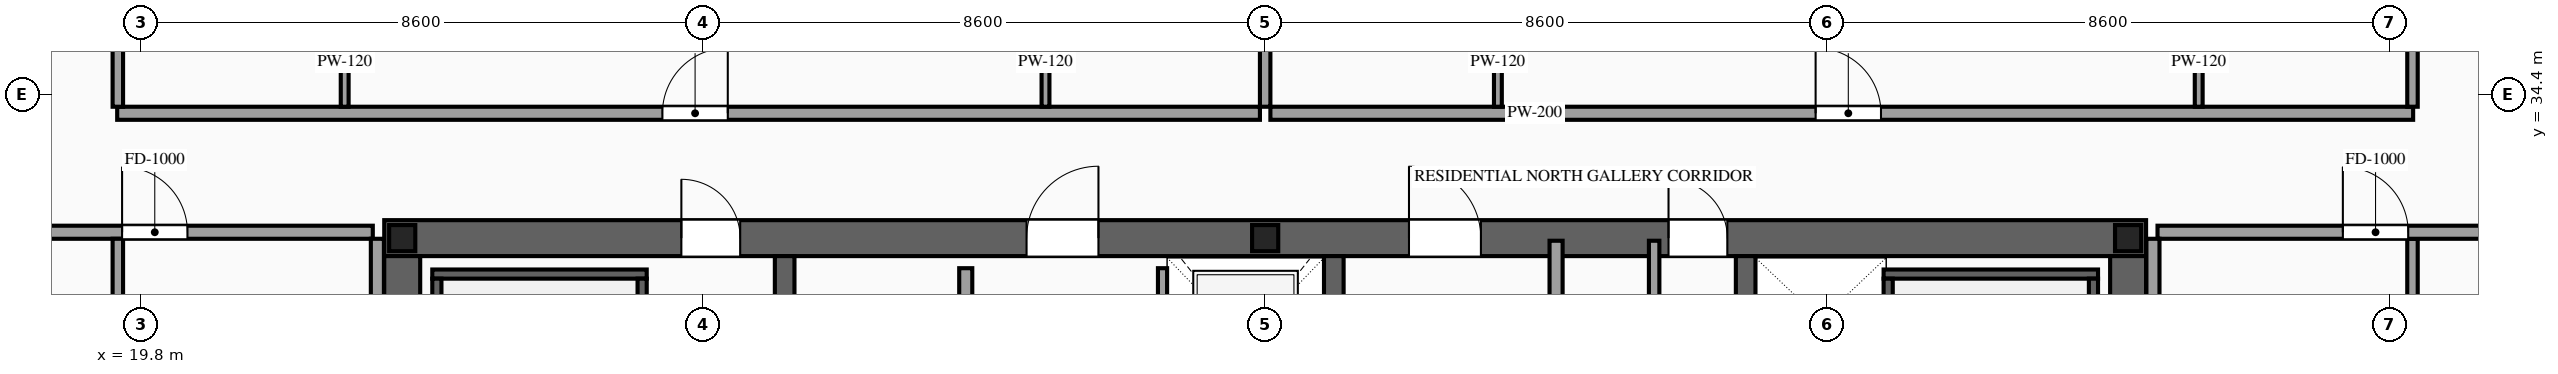
"""IFC4 building model, lengths in metres.
Left out: names, types, materials, properties, quantities, classifications, styles, units other than length and angle.
Written with IfcOpenShell. Run it as: python <this file> out.ifc"""

import sys

from ifc_helpers import new_model, si_unit, direction, frame, frame_2d, origin, origin_2d, place, context, subcontext, project, spatial, rectangle, i_section, extrude, source, transform, mapped, element, fill, save


model = new_model("IFC4")
c1 = context("Model", 3, precision=1e-05, world=origin(), true_north=direction((0.0, 1.0)))
c2 = subcontext(c1, "Body", "Model", "MODEL_VIEW")
j1 = project(units=[si_unit("LENGTHUNIT", "METRE"), si_unit("PLANEANGLEUNIT", "RADIAN")], contexts=[c1])
p1 = place(None, origin())
s1 = spatial("IfcSite", under=j1, at=p1, CompositionType="ELEMENT")
p2 = place(p1, origin())
s2 = spatial("IfcBuilding", under=s1, at=p2, CompositionType="ELEMENT")
p3 = place(p2, frame((0.0, 0.0, 231.1)))
s3 = spatial("IfcBuildingStorey", under=s2, at=p3, CompositionType="ELEMENT", Elevation=231.1)
p4 = place(p3, frame((23.525, 32.2, 0.0), z_axis=(0.0, 0.0, 1.0), x_axis=(1.0, 0.0, 0.0)))
e1 = element("IfcWall", 1, at=p4, inside=s3, PredefinedType="SHEAR", context=c2, shape_type="SweptSolid", body=[
    extrude(rectangle(XDim=26.95, YDim=0.55, at=frame_2d((13.475, 0.0))), origin(), (0.0, 0.0, 1.0), 3.5),
])
p5 = place(p4, frame((4.545, 0.0, 0.0)))
e2 = element("IfcOpeningElement", 2, at=p5, cuts=e1, PredefinedType="OPENING", context=c2, shape_type="SweptSolid", body=[
    extrude(rectangle(XDim=0.9, YDim=2.15, at=frame_2d((0.45, 1.075))), frame((0.0, 0.29, 0.0), z_axis=(0.0, -1.0, 0.0), x_axis=(1.0, 0.0, 0.0)), (0.0, 0.0, 1.0), 0.58),
])
p6 = place(p4, frame((9.825, 0.0, 0.0)))
e3 = element("IfcOpeningElement", 3, at=p6, cuts=e1, PredefinedType="OPENING", context=c2, shape_type="SweptSolid", body=[
    extrude(rectangle(XDim=1.1, YDim=2.2, at=frame_2d((0.55, 1.1))), frame((0.0, 0.29, 0.0), z_axis=(0.0, -1.0, 0.0), x_axis=(1.0, 0.0, 0.0)), (0.0, 0.0, 1.0), 0.58),
])
p7 = place(p4, frame((15.675, 0.0, 0.0)))
e4 = element("IfcOpeningElement", 4, at=p7, cuts=e1, PredefinedType="OPENING", context=c2, shape_type="SweptSolid", body=[
    extrude(rectangle(XDim=1.1, YDim=2.2, at=frame_2d((0.55, 1.1))), frame((0.0, 0.29, 0.0), z_axis=(0.0, -1.0, 0.0), x_axis=(1.0, 0.0, 0.0)), (0.0, 0.0, 1.0), 0.58),
])
p8 = place(p4, frame((19.645, 0.0, 0.0)))
e5 = element("IfcOpeningElement", 5, at=p8, cuts=e1, PredefinedType="OPENING", context=c2, shape_type="SweptSolid", body=[
    extrude(rectangle(XDim=0.9, YDim=2.15, at=frame_2d((0.45, 1.075))), frame((0.0, 0.29, 0.0), z_axis=(0.0, -1.0, 0.0), x_axis=(1.0, 0.0, 0.0)), (0.0, 0.0, 1.0), 0.58),
])
m1 = source(origin(), c2, "Body", "SweptSolid", [
    extrude(rectangle(XDim=12.25, YDim=0.55, at=frame_2d((6.125, 0.0))), origin(), (0.0, 0.0, 1.0), 3.5),
])
for number, where, z_axis, x_axis in (
    (6, (23.8, 19.675, 0.0), (0.0, 0.0, 1.0), (0.0, 1.0, 0.0)),
    (7, (50.2, 19.675, 0.0), (0.0, 0.0, 1.0), (0.0, 1.0, 0.0)),
):
    element("IfcWall", number, at=place(p3, frame(where, z_axis=z_axis, x_axis=x_axis)), inside=s3, PredefinedType="SHEAR", context=c2, shape_type="MappedRepresentation", body=[
        mapped(m1, transform((0.0, 0.0, 0.0), scale=1.0)),
    ])
m2 = source(origin(), c2, "Body", "SweptSolid", [
    extrude(rectangle(XDim=12.25, YDim=0.3, at=frame_2d((6.125, 0.0))), origin(), (0.0, 0.0, 1.0), 3.5),
])
for number, where, z_axis, x_axis in (
    (8, (29.65, 19.675, 0.0), (0.0, 0.0, 1.0), (0.0, 1.0, 0.0)),
    (9, (38.05, 19.675, 0.0), (0.0, 0.0, 1.0), (0.0, 1.0, 0.0)),
    (10, (44.35, 19.675, 0.0), (0.0, 0.0, 1.0), (0.0, 1.0, 0.0)),
):
    element("IfcWall", number, at=place(p3, frame(where, z_axis=z_axis, x_axis=x_axis)), inside=s3, PredefinedType="SOLIDWALL", context=c2, shape_type="MappedRepresentation", body=[
        mapped(m2, transform((0.0, 0.0, 0.0), scale=1.0)),
    ])
m3 = source(origin(), c2, "Body", "SweptSolid", [
    extrude(i_section(OverallWidth=0.4, OverallDepth=0.4, WebThickness=0.013, FlangeThickness=0.021, at=origin_2d()), origin(), (0.0, 0.0, 1.0), 3.5),
])
for number, where, z_axis, x_axis in (
    (11, (23.8, 32.2, 0.0), (0.0, 0.0, 1.0), (1.0, 0.0, 0.0)),
    (12, (37.0, 32.2, 0.0), (0.0, 0.0, 1.0), (1.0, 0.0, 0.0)),
    (13, (50.2, 32.2, 0.0), (0.0, 0.0, 1.0), (1.0, 0.0, 0.0)),
):
    element("IfcColumn", number, at=place(p3, frame(where, z_axis=z_axis, x_axis=x_axis)), inside=s3, PredefinedType="COLUMN", context=c2, shape_type="MappedRepresentation", body=[
        mapped(m3, transform((0.0, 0.0, 0.0), scale=1.0)),
    ])
p9 = place(p3, frame((35.43, 29.4, 0.0), z_axis=(0.0, 0.0, 1.0), x_axis=(0.0, 1.0, 0.0)))
e14 = element("IfcWall", 14, at=p9, inside=s3, PredefinedType="SOLIDWALL", context=c2, shape_type="SweptSolid", body=[
    extrude(rectangle(XDim=2.34, YDim=0.14, at=frame_2d((1.17, 0.0))), origin(), (0.0, 0.0, 1.0), 3.28),
])
p10 = place(p9, frame((0.62, 0.0, 0.0)))
e15 = element("IfcOpeningElement", 15, at=p10, cuts=e14, PredefinedType="OPENING", context=c2, shape_type="SweptSolid", body=[
    extrude(rectangle(XDim=1.1, YDim=2.2, at=frame_2d((0.55, 1.1))), frame((0.0, 0.085, 0.0), z_axis=(0.0, -1.0, 0.0), x_axis=(1.0, 0.0, 0.0)), (0.0, 0.0, 1.0), 0.17),
])
m4 = source(origin(), c2, "Body", "SweptSolid", [
    extrude(rectangle(XDim=3.28, YDim=0.14, at=frame_2d((1.64, 0.0))), origin(), (0.0, 0.0, 1.0), 3.28),
])
p11 = place(p3, frame((24.26, 31.65, 0.0), z_axis=(0.0, 0.0, 1.0), x_axis=(1.0, 0.0, 0.0)))
e16 = element("IfcWall", 16, at=p11, inside=s3, PredefinedType="SOLIDWALL", context=c2, shape_type="MappedRepresentation", body=[
    mapped(m4, transform((0.0, 0.0, 0.0), scale=1.0)),
])
m5 = source(origin(), c2, "Body", "SweptSolid", [
    extrude(rectangle(XDim=8.94, YDim=0.14, at=frame_2d((4.47, 0.0))), origin(), (0.0, 0.0, 1.0), 3.28),
])
for number, where, z_axis, x_axis in (
    (17, (24.33, 22.64, 0.0), (0.0, 0.0, 1.0), (0.0, 1.0, 0.0)),
    (18, (27.47, 22.64, 0.0), (0.0, 0.0, 1.0), (0.0, 1.0, 0.0)),
):
    element("IfcWall", number, at=place(p3, frame(where, z_axis=z_axis, x_axis=x_axis)), inside=s3, PredefinedType="SOLIDWALL", context=c2, shape_type="MappedRepresentation", body=[
        mapped(m5, transform((0.0, 0.0, 0.0), scale=1.0)),
    ])
p12 = place(p3, frame((46.46, 31.65, 0.0), z_axis=(0.0, 0.0, 1.0), x_axis=(1.0, 0.0, 0.0)))
e19 = element("IfcWall", 19, at=p12, inside=s3, PredefinedType="SOLIDWALL", context=c2, shape_type="MappedRepresentation", body=[
    mapped(m4, transform((0.0, 0.0, 0.0), scale=1.0)),
])
for number, where, z_axis, x_axis in (
    (20, (46.53, 22.64, 0.0), (0.0, 0.0, 1.0), (0.0, 1.0, 0.0)),
    (21, (49.67, 22.64, 0.0), (0.0, 0.0, 1.0), (0.0, 1.0, 0.0)),
):
    element("IfcWall", number, at=place(p3, frame(where, z_axis=z_axis, x_axis=x_axis)), inside=s3, PredefinedType="SOLIDWALL", context=c2, shape_type="MappedRepresentation", body=[
        mapped(m5, transform((0.0, 0.0, 0.0), scale=1.0)),
    ])
p13 = place(p3, frame((32.42, 25.92, 0.0), z_axis=(0.0, 0.0, 1.0), x_axis=(0.0, 1.0, 0.0)))
e22 = element("IfcWall", 22, at=p13, inside=s3, PredefinedType="PARTITIONING", context=c2, shape_type="SweptSolid", body=[
    extrude(rectangle(XDim=5.82, YDim=0.2, at=frame_2d((2.91, 0.0))), origin(), (0.0, 0.0, 1.0), 3.28),
])
p14 = place(p13, frame((2.46, 0.0, 0.0)))
e23 = element("IfcOpeningElement", 23, at=p14, cuts=e22, PredefinedType="OPENING", context=c2, shape_type="SweptSolid", body=[
    extrude(rectangle(XDim=0.9, YDim=2.15, at=frame_2d((0.45, 1.075))), frame((0.0, 0.115, 0.0), z_axis=(0.0, -1.0, 0.0), x_axis=(1.0, 0.0, 0.0)), (0.0, 0.0, 1.0), 0.23),
])
m6 = source(origin(), c2, "Body", "SweptSolid", [
    extrude(rectangle(XDim=12.72, YDim=0.2, at=frame_2d((6.36, 0.0))), origin(), (0.0, 0.0, 1.0), 3.28),
])
p15 = place(p3, frame((41.45, 19.44, 0.0), z_axis=(0.0, 0.0, 1.0), x_axis=(0.0, 1.0, 0.0)))
e24 = element("IfcWall", 24, at=p15, inside=s3, PredefinedType="PARTITIONING", context=c2, shape_type="MappedRepresentation", body=[
    mapped(m6, transform((0.0, 0.0, 0.0), scale=1.0)),
])
m7 = source(origin(), c2, "Body", "SweptSolid", [
    extrude(rectangle(XDim=10.72, YDim=0.16, at=frame_2d((5.36, 0.0))), origin(), (0.0, 0.0, 1.0), 3.28),
])
p16 = place(p3, frame((42.95, 21.44, 0.0), z_axis=(0.0, 0.0, 1.0), x_axis=(0.0, 1.0, 0.0)))
e25 = element("IfcWall", 25, at=p16, inside=s3, PredefinedType="PARTITIONING", context=c2, shape_type="MappedRepresentation", body=[
    mapped(m7, transform((0.0, 0.0, 0.0), scale=1.0)),
])
p17 = place(p3, frame((19.44, 34.11, 0.0), z_axis=(0.0, 0.0, 1.0), x_axis=(1.0, 0.0, 0.0)))
e26 = element("IfcWall", 26, at=p17, inside=s3, PredefinedType="PARTITIONING", context=c2, shape_type="SweptSolid", body=[
    extrude(rectangle(XDim=17.48, YDim=0.2, at=frame_2d((8.74, 0.0))), origin(), (0.0, 0.0, 1.0), 3.28),
])
p18 = place(p17, frame((8.34, 0.0, 0.0)))
e27 = element("IfcOpeningElement", 27, at=p18, cuts=e26, PredefinedType="OPENING", context=c2, shape_type="SweptSolid", body=[
    extrude(rectangle(XDim=1.0, YDim=2.2, at=frame_2d((0.5, 1.1))), frame((0.0, 0.115, 0.0), z_axis=(0.0, -1.0, 0.0), x_axis=(1.0, 0.0, 0.0)), (0.0, 0.0, 1.0), 0.23),
])
m8 = source(origin(), c2, "Body", "SweptSolid", [
    extrude(rectangle(XDim=12.04, YDim=0.16, at=frame_2d((6.02, 0.0))), origin(), (0.0, 0.0, 1.0), 2.787),
])
p19 = place(p3, frame((37.0, 34.21, 0.0), z_axis=(0.0, 0.0, 1.0), x_axis=(0.0, 1.0, 0.0)))
e28 = element("IfcWall", 28, at=p19, inside=s3, PredefinedType="PARTITIONING", context=c2, shape_type="MappedRepresentation", body=[
    mapped(m8, transform((0.0, 0.0, 0.0), scale=1.0)),
])
p20 = place(p3, frame((22.92, 34.21, 0.0), z_axis=(0.0, 0.0, 1.0), x_axis=(0.0, 1.0, 0.0)))
e29 = element("IfcWall", 29, at=p20, inside=s3, PredefinedType="PARTITIONING", context=c2, shape_type="SweptSolid", body=[
    extrude(rectangle(XDim=4.11, YDim=0.12, at=frame_2d((2.055, 0.0))), origin(), (0.0, 0.0, 1.0), 3.28),
])
p21 = place(p20, frame((1.63, 0.0, 0.0)))
e30 = element("IfcOpeningElement", 30, at=p21, cuts=e29, PredefinedType="OPENING", context=c2, shape_type="SweptSolid", body=[
    extrude(rectangle(XDim=0.85, YDim=2.1, at=frame_2d((0.425, 1.05))), frame((0.0, 0.075, 0.0), z_axis=(0.0, -1.0, 0.0), x_axis=(1.0, 0.0, 0.0)), (0.0, 0.0, 1.0), 0.15),
])
p22 = place(p3, frame((33.64, 34.21, 0.0), z_axis=(0.0, 0.0, 1.0), x_axis=(0.0, 1.0, 0.0)))
e31 = element("IfcWall", 31, at=p22, inside=s3, PredefinedType="PARTITIONING", context=c2, shape_type="SweptSolid", body=[
    extrude(rectangle(XDim=4.11, YDim=0.12, at=frame_2d((2.055, 0.0))), origin(), (0.0, 0.0, 1.0), 3.28),
])
p23 = place(p22, frame((1.63, 0.0, 0.0)))
e32 = element("IfcOpeningElement", 32, at=p23, cuts=e31, PredefinedType="OPENING", context=c2, shape_type="SweptSolid", body=[
    extrude(rectangle(XDim=0.85, YDim=2.1, at=frame_2d((0.425, 1.05))), frame((0.0, 0.075, 0.0), z_axis=(0.0, -1.0, 0.0), x_axis=(1.0, 0.0, 0.0)), (0.0, 0.0, 1.0), 0.15),
])
p24 = place(p3, frame((37.08, 34.11, 0.0), z_axis=(0.0, 0.0, 1.0), x_axis=(1.0, 0.0, 0.0)))
e33 = element("IfcWall", 33, at=p24, inside=s3, PredefinedType="PARTITIONING", context=c2, shape_type="SweptSolid", body=[
    extrude(rectangle(XDim=17.48, YDim=0.2, at=frame_2d((8.74, 0.0))), origin(), (0.0, 0.0, 1.0), 3.28),
])
p25 = place(p24, frame((8.34, 0.0, 0.0)))
e34 = element("IfcOpeningElement", 34, at=p25, cuts=e33, PredefinedType="OPENING", context=c2, shape_type="SweptSolid", body=[
    extrude(rectangle(XDim=1.0, YDim=2.2, at=frame_2d((0.5, 1.1))), frame((0.0, 0.115, 0.0), z_axis=(0.0, -1.0, 0.0), x_axis=(1.0, 0.0, 0.0)), (0.0, 0.0, 1.0), 0.23),
])
m9 = source(origin(), c2, "Body", "SweptSolid", [
    extrude(rectangle(XDim=11.89, YDim=0.16, at=frame_2d((5.945, 0.0))), origin(), (0.0, 0.0, 1.0), 3.28),
])
for number, where, z_axis, x_axis in (
    (35, (19.45, 34.21, 0.0), (0.0, 0.0, 1.0), (0.0, 1.0, 0.0)),
    (36, (54.55, 34.21, 0.0), (0.0, 0.0, 1.0), (0.0, 1.0, 0.0)),
):
    element("IfcWall", number, at=place(p3, frame(where, z_axis=z_axis, x_axis=x_axis)), inside=s3, PredefinedType="PARTITIONING", context=c2, shape_type="MappedRepresentation", body=[
        mapped(m9, transform((0.0, 0.0, 0.0), scale=1.0)),
    ])
p26 = place(p3, frame((40.56, 34.21, 0.0), z_axis=(0.0, 0.0, 1.0), x_axis=(0.0, 1.0, 0.0)))
e37 = element("IfcWall", 37, at=p26, inside=s3, PredefinedType="PARTITIONING", context=c2, shape_type="SweptSolid", body=[
    extrude(rectangle(XDim=4.11, YDim=0.12, at=frame_2d((2.055, 0.0))), origin(), (0.0, 0.0, 1.0), 3.28),
])
p27 = place(p26, frame((1.63, 0.0, 0.0)))
e38 = element("IfcOpeningElement", 38, at=p27, cuts=e37, PredefinedType="OPENING", context=c2, shape_type="SweptSolid", body=[
    extrude(rectangle(XDim=0.85, YDim=2.1, at=frame_2d((0.425, 1.05))), frame((0.0, 0.075, 0.0), z_axis=(0.0, -1.0, 0.0), x_axis=(1.0, 0.0, 0.0)), (0.0, 0.0, 1.0), 0.15),
])
p28 = place(p3, frame((51.28, 34.21, 0.0), z_axis=(0.0, 0.0, 1.0), x_axis=(0.0, 1.0, 0.0)))
e39 = element("IfcWall", 39, at=p28, inside=s3, PredefinedType="PARTITIONING", context=c2, shape_type="SweptSolid", body=[
    extrude(rectangle(XDim=4.11, YDim=0.12, at=frame_2d((2.055, 0.0))), origin(), (0.0, 0.0, 1.0), 3.28),
])
p29 = place(p28, frame((1.63, 0.0, 0.0)))
e40 = element("IfcOpeningElement", 40, at=p29, cuts=e39, PredefinedType="OPENING", context=c2, shape_type="SweptSolid", body=[
    extrude(rectangle(XDim=0.85, YDim=2.1, at=frame_2d((0.425, 1.05))), frame((0.0, 0.075, 0.0), z_axis=(0.0, -1.0, 0.0), x_axis=(1.0, 0.0, 0.0)), (0.0, 0.0, 1.0), 0.15),
])
p30 = place(p3, frame((16.55, 32.29, 0.0), z_axis=(0.0, 0.0, 1.0), x_axis=(1.0, 0.0, 0.0)))
e41 = element("IfcWall", 41, at=p30, inside=s3, PredefinedType="PARTITIONING", context=c2, shape_type="SweptSolid", body=[
    extrude(rectangle(XDim=6.8, YDim=0.2, at=frame_2d((3.4, 0.0))), origin(), (0.0, 0.0, 1.0), 2.825),
])
p31 = place(p30, frame((2.965, 0.0, 0.0)))
e42 = element("IfcOpeningElement", 42, at=p31, cuts=e41, PredefinedType="OPENING", context=c2, shape_type="SweptSolid", body=[
    extrude(rectangle(XDim=1.0, YDim=2.2, at=frame_2d((0.5, 1.1))), frame((0.0, 0.115, 0.0), z_axis=(0.0, -1.0, 0.0), x_axis=(1.0, 0.0, 0.0)), (0.0, 0.0, 1.0), 0.23),
])
m10 = source(origin(), c2, "Body", "SweptSolid", [
    extrude(rectangle(XDim=26.69, YDim=0.16, at=frame_2d((13.345, 0.0))), origin(), (0.0, 0.0, 1.0), 3.28),
])
for number, where, z_axis, x_axis in (
    (43, (19.45, 5.5, 0.0), (0.0, 0.0, 1.0), (0.0, 1.0, 0.0)),
    (44, (54.55, 5.5, 0.0), (0.0, 0.0, 1.0), (0.0, 1.0, 0.0)),
):
    element("IfcWall", number, at=place(p3, frame(where, z_axis=z_axis, x_axis=x_axis)), inside=s3, PredefinedType="PARTITIONING", context=c2, shape_type="MappedRepresentation", body=[
        mapped(m10, transform((0.0, 0.0, 0.0), scale=1.0)),
    ])
m11 = source(origin(), c2, "Body", "SweptSolid", [
    extrude(rectangle(XDim=6.29, YDim=0.2, at=frame_2d((3.145, 0.0))), origin(), (0.0, 0.0, 1.0), 3.28),
])
p32 = place(p3, frame((23.42, 25.9, 0.0), z_axis=(0.0, 0.0, 1.0), x_axis=(0.0, 1.0, 0.0)))
e45 = element("IfcWall", 45, at=p32, inside=s3, PredefinedType="PARTITIONING", context=c2, shape_type="MappedRepresentation", body=[
    mapped(m11, transform((0.0, 0.0, 0.0), scale=1.0)),
])
p33 = place(p3, frame((50.65, 32.29, 0.0), z_axis=(0.0, 0.0, 1.0), x_axis=(1.0, 0.0, 0.0)))
e46 = element("IfcWall", 46, at=p33, inside=s3, PredefinedType="PARTITIONING", context=c2, shape_type="SweptSolid", body=[
    extrude(rectangle(XDim=6.8, YDim=0.2, at=frame_2d((3.4, 0.0))), origin(), (0.0, 0.0, 1.0), 2.825),
])
p34 = place(p33, frame((2.835, 0.0, 0.0)))
e47 = element("IfcOpeningElement", 47, at=p34, cuts=e46, PredefinedType="OPENING", context=c2, shape_type="SweptSolid", body=[
    extrude(rectangle(XDim=1.0, YDim=2.2, at=frame_2d((0.5, 1.1))), frame((0.0, 0.115, 0.0), z_axis=(0.0, -1.0, 0.0), x_axis=(1.0, 0.0, 0.0)), (0.0, 0.0, 1.0), 0.23),
])
p35 = place(p3, frame((50.58, 25.9, 0.0), z_axis=(0.0, 0.0, 1.0), x_axis=(0.0, 1.0, 0.0)))
e48 = element("IfcWall", 48, at=p35, inside=s3, PredefinedType="PARTITIONING", context=c2, shape_type="MappedRepresentation", body=[
    mapped(m11, transform((0.0, 0.0, 0.0), scale=1.0)),
])
m12 = source(origin(), c2, "Body", "SweptSolid", [
    extrude(rectangle(XDim=0.9, YDim=2.15, at=frame_2d((0.45, 1.075))), frame((0.0, 0.025, 0.0), z_axis=(0.0, -1.0, 0.0), x_axis=(1.0, 0.0, 0.0)), (0.0, 0.0, 1.0), 0.05),
])
p36 = place(p5, origin())
e49 = element("IfcDoor", 49, at=p36, inside=s3, OperationType="SINGLE_SWING_LEFT", PredefinedType="DOOR", context=c2, shape_type="MappedRepresentation", body=[
    mapped(m12, transform((0.0, 0.0, 0.0), scale=1.0)),
])
fill(e2, e49)
m13 = source(origin(), c2, "Body", "SweptSolid", [
    extrude(rectangle(XDim=1.1, YDim=2.2, at=frame_2d((0.55, 1.1))), frame((0.0, 0.025, 0.0), z_axis=(0.0, -1.0, 0.0), x_axis=(1.0, 0.0, 0.0)), (0.0, 0.0, 1.0), 0.05),
])
p37 = place(p6, origin())
e50 = element("IfcDoor", 50, at=p37, inside=s3, OperationType="SINGLE_SWING_RIGHT", PredefinedType="DOOR", context=c2, shape_type="MappedRepresentation", body=[
    mapped(m13, transform((0.0, 0.0, 0.0), scale=1.0)),
])
fill(e3, e50)
p38 = place(p7, origin())
e51 = element("IfcDoor", 51, at=p38, inside=s3, OperationType="SINGLE_SWING_LEFT", PredefinedType="DOOR", context=c2, shape_type="MappedRepresentation", body=[
    mapped(m13, transform((0.0, 0.0, 0.0), scale=1.0)),
])
fill(e4, e51)
p39 = place(p8, origin())
e52 = element("IfcDoor", 52, at=p39, inside=s3, OperationType="SINGLE_SWING_LEFT", PredefinedType="DOOR", context=c2, shape_type="MappedRepresentation", body=[
    mapped(m12, transform((0.0, 0.0, 0.0), scale=1.0)),
])
fill(e5, e52)
m14 = source(origin(), c2, "Body", "SweptSolid", [
    extrude(rectangle(XDim=1.0, YDim=2.2, at=frame_2d((0.5, 1.1))), frame((0.0, 0.025, 0.0), z_axis=(0.0, -1.0, 0.0), x_axis=(1.0, 0.0, 0.0)), (0.0, 0.0, 1.0), 0.05),
])
p40 = place(p18, origin())
e53 = element("IfcDoor", 53, at=p40, inside=s3, OperationType="SINGLE_SWING_RIGHT", PredefinedType="DOOR", context=c2, shape_type="MappedRepresentation", body=[
    mapped(m14, transform((0.0, 0.0, 0.0), scale=1.0)),
])
fill(e27, e53)
p41 = place(p25, origin())
e54 = element("IfcDoor", 54, at=p41, inside=s3, OperationType="SINGLE_SWING_LEFT", PredefinedType="DOOR", context=c2, shape_type="MappedRepresentation", body=[
    mapped(m14, transform((0.0, 0.0, 0.0), scale=1.0)),
])
fill(e34, e54)
p42 = place(p31, origin())
e55 = element("IfcDoor", 55, at=p42, inside=s3, OperationType="SINGLE_SWING_LEFT", PredefinedType="DOOR", context=c2, shape_type="MappedRepresentation", body=[
    mapped(m14, transform((0.0, 0.0, 0.0), scale=1.0)),
])
fill(e42, e55)
p43 = place(p34, origin())
e56 = element("IfcDoor", 56, at=p43, inside=s3, OperationType="SINGLE_SWING_LEFT", PredefinedType="DOOR", context=c2, shape_type="MappedRepresentation", body=[
    mapped(m14, transform((0.0, 0.0, 0.0), scale=1.0)),
])
fill(e47, e56)
save(model, sys.argv[1])
